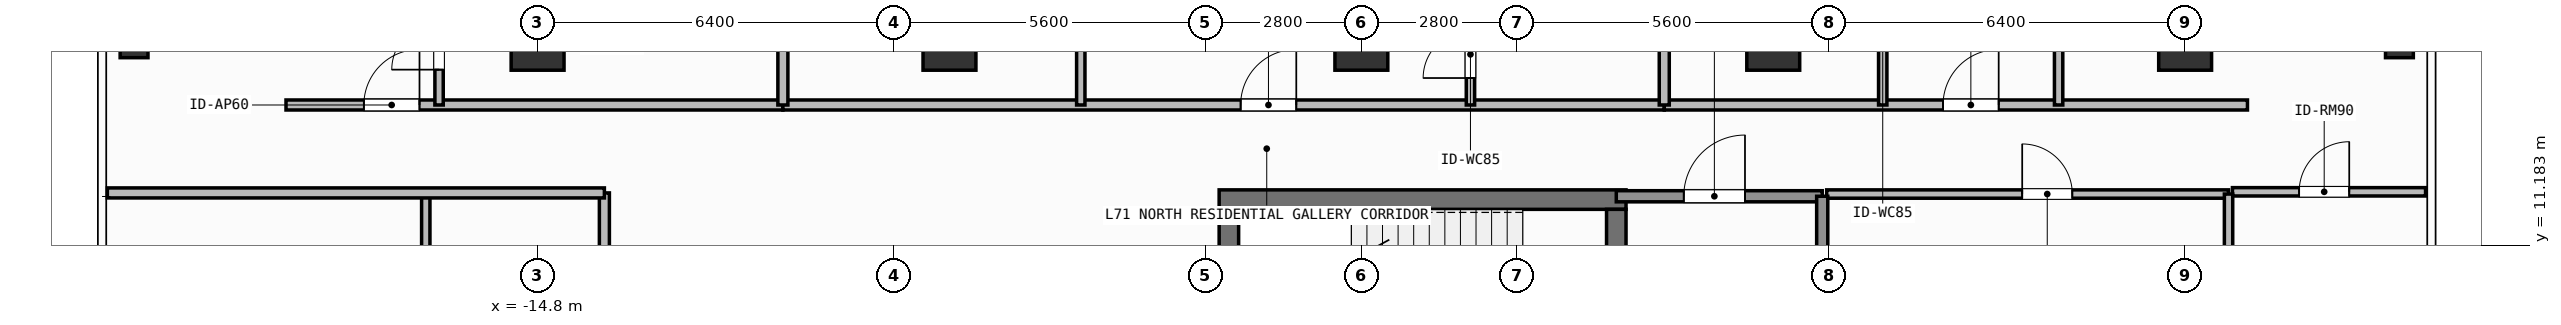
"""IFC4 building model, lengths in metres.
Left out: names, types, materials, properties, quantities, classifications, styles, units other than length and angle.
Written with IfcOpenShell. Run it as: python <this file> out.ifc"""

import sys

from ifc_helpers import new_model, si_unit, direction, frame, frame_2d, origin, origin_2d, place, context, subcontext, project, spatial, rectangle, hollow_rectangle, extrude, element, fill, save


model = new_model("IFC4")
c1 = context("Model", 3, precision=1e-05, world=origin(), true_north=direction((0.0, 1.0)))
c2 = subcontext(c1, "Body", "Model", "MODEL_VIEW")
j1 = project(units=[si_unit("LENGTHUNIT", "METRE"), si_unit("PLANEANGLEUNIT", "RADIAN")], contexts=[c1])
p1 = place(None, origin())
s1 = spatial("IfcSite", under=j1, at=p1, CompositionType="ELEMENT")
p2 = place(p1, origin())
s2 = spatial("IfcBuilding", under=s1, at=p2, CompositionType="ELEMENT")
p3 = place(p2, frame((0.0, 0.0, 289.8)))
s3 = spatial("IfcBuildingStorey", under=s2, at=p3, CompositionType="ELEMENT", Elevation=289.8)
p4 = place(p3, frame((-2.555, 12.0, 0.0), z_axis=(0.0, 0.0, 1.0), x_axis=(1.0, 0.0, 0.0)))
e1 = element("IfcWall", 1, at=p4, inside=s3, PredefinedType="SHEAR", context=c2, shape_type="SweptSolid", body=[
    extrude(rectangle(XDim=7.31, YDim=0.35, at=frame_2d((3.655, 0.0))), origin(), (0.0, 0.0, 1.0), 3.9),
])
p5 = place(p3, frame((-2.38, 8.9, 0.0), z_axis=(0.0, 0.0, 1.0), x_axis=(0.0, 1.0, 0.0)))
e2 = element("IfcWall", 2, at=p5, inside=s3, PredefinedType="SHEAR", context=c2, shape_type="SweptSolid", body=[
    extrude(rectangle(XDim=2.925, YDim=0.35, at=frame_2d((1.462, 0.0))), origin(), (0.0, 0.0, 1.0), 3.9),
])
p6 = place(p3, frame((4.58, 11.825, 0.0), z_axis=(0.0, 0.0, 1.0), x_axis=(0.0, -1.0, 0.0)))
e3 = element("IfcWall", 3, at=p6, inside=s3, PredefinedType="SHEAR", context=c2, shape_type="SweptSolid", body=[
    extrude(rectangle(XDim=2.925, YDim=0.35, at=frame_2d((1.462, 0.0))), origin(), (0.0, 0.0, 1.0), 3.9),
])
p7 = place(p6, frame((0.913, 0.0, 0.0)))
e4 = element("IfcOpeningElement", 4, at=p7, cuts=e3, PredefinedType="OPENING", context=c2, shape_type="SweptSolid", body=[
    extrude(rectangle(XDim=1.1, YDim=2.15, at=frame_2d((0.55, 1.075))), frame((0.0, 0.185, 0.0), z_axis=(0.0, -1.0, 0.0), x_axis=(1.0, 0.0, 0.0)), (0.0, 0.0, 1.0), 0.37),
])
for number, where, z_axis, x_axis in (
    (5, (-14.8, 14.8, 0.0), (0.0, 0.0, 1.0), (1.0, 0.0, 0.0)),
    (6, (-7.4, 14.8, 0.0), (0.0, 0.0, 1.0), (1.0, 0.0, 0.0)),
    (7, (0.0, 14.8, 0.0), (0.0, 0.0, 1.0), (1.0, 0.0, 0.0)),
    (8, (7.4, 14.8, 0.0), (0.0, 0.0, 1.0), (1.0, 0.0, 0.0)),
    (9, (14.8, 14.8, 0.0), (0.0, 0.0, 1.0), (1.0, 0.0, 0.0)),
):
    element("IfcColumn", number, at=place(p3, frame(where, z_axis=z_axis, x_axis=x_axis)), inside=s3, PredefinedType="COLUMN", context=c2, shape_type="SweptSolid", body=[
        extrude(rectangle(XDim=0.95, YDim=0.95, at=origin_2d()), origin(), (0.0, 0.0, 1.0), 3.9),
    ])
for number, where, z_axis, x_axis in (
    (10, (-22.05, 14.8, 0.0), (0.0, 0.0, 1.0), (1.0, 0.0, 0.0)),
    (11, (18.65, 14.8, 0.0), (0.0, 0.0, 1.0), (1.0, 0.0, 0.0)),
):
    element("IfcColumn", number, at=place(p3, frame(where, z_axis=z_axis, x_axis=x_axis)), inside=s3, PredefinedType="COLUMN", context=c2, shape_type="SweptSolid", body=[
        extrude(hollow_rectangle(XDim=0.5, YDim=0.5, WallThickness=0.025, at=origin_2d()), origin(), (0.0, 0.0, 1.0), 3.9),
    ])
p8 = place(p3, frame((4.58, 12.06, 0.0), z_axis=(0.0, 0.0, 1.0), x_axis=(1.0, 0.0, 0.0)))
e12 = element("IfcWall", 12, at=p8, inside=s3, PredefinedType="SOLIDWALL", context=c2, shape_type="SweptSolid", body=[
    extrude(rectangle(XDim=3.7, YDim=0.2, at=frame_2d((1.85, 0.0))), origin(), (0.0, 0.0, 1.0), 3.68),
])
p9 = place(p8, frame((1.212, 0.0, 0.0)))
e13 = element("IfcOpeningElement", 13, at=p9, cuts=e12, PredefinedType="OPENING", context=c2, shape_type="SweptSolid", body=[
    extrude(rectangle(XDim=1.1, YDim=2.15, at=frame_2d((0.55, 1.075))), frame((0.0, 0.11, 0.0), z_axis=(0.0, -1.0, 0.0), x_axis=(1.0, 0.0, 0.0)), (0.0, 0.0, 1.0), 0.22),
])
p10 = place(p3, frame((8.36, 12.1, 0.0), z_axis=(0.0, 0.0, 1.0), x_axis=(1.0, 0.0, 0.0)))
e14 = element("IfcWall", 14, at=p10, inside=s3, PredefinedType="PARTITIONING", context=c2, shape_type="SweptSolid", body=[
    extrude(rectangle(XDim=7.22, YDim=0.15, at=frame_2d((3.61, 0.0))), origin(), (0.0, 0.0, 1.0), 3.68),
])
p11 = place(p10, frame((3.513, 0.0, 0.0)))
e15 = element("IfcOpeningElement", 15, at=p11, cuts=e14, PredefinedType="OPENING", context=c2, shape_type="SweptSolid", body=[
    extrude(rectangle(XDim=0.9, YDim=2.1, at=frame_2d((0.45, 1.05))), frame((0.0, 0.085, 0.0), z_axis=(0.0, -1.0, 0.0), x_axis=(1.0, 0.0, 0.0)), (0.0, 0.0, 1.0), 0.17),
])
p12 = place(p3, frame((-19.32, 13.7, 0.0), z_axis=(0.0, 0.0, 1.0), x_axis=(1.0, 0.0, 0.0)))
e16 = element("IfcWall", 16, at=p12, inside=s3, PredefinedType="PARTITIONING", context=c2, shape_type="SweptSolid", body=[
    extrude(rectangle(XDim=8.927, YDim=0.18, at=frame_2d((4.463, 0.0))), origin(), (0.0, 0.0, 1.0), 3.68),
])
p13 = place(p12, frame((1.398, 0.0, 0.0)))
e17 = element("IfcOpeningElement", 17, at=p13, cuts=e16, PredefinedType="OPENING", context=c2, shape_type="SweptSolid", body=[
    extrude(rectangle(XDim=1.0, YDim=2.2, at=frame_2d((0.5, 1.1))), frame((0.0, 0.1, 0.0), z_axis=(0.0, -1.0, 0.0), x_axis=(1.0, 0.0, 0.0)), (0.0, 0.0, 1.0), 0.2),
])
p14 = place(p3, frame((-16.57, 13.7, 0.0), z_axis=(0.0, 0.0, 1.0), x_axis=(0.0, 1.0, 0.0)))
e18 = element("IfcWall", 18, at=p14, inside=s3, PredefinedType="PARTITIONING", context=c2, shape_type="SweptSolid", body=[
    extrude(rectangle(XDim=2.12, YDim=0.15, at=frame_2d((1.06, 0.0))), origin(), (0.0, 0.0, 1.0), 3.68),
])
p15 = place(p14, frame((0.635, 0.0, 0.0)))
e19 = element("IfcOpeningElement", 19, at=p15, cuts=e18, PredefinedType="OPENING", context=c2, shape_type="SweptSolid", body=[
    extrude(rectangle(XDim=0.85, YDim=2.1, at=frame_2d((0.425, 1.05))), frame((0.0, 0.085, 0.0), z_axis=(0.0, -1.0, 0.0), x_axis=(1.0, 0.0, 0.0)), (0.0, 0.0, 1.0), 0.17),
])
p16 = place(p3, frame((-10.393, 13.7, 0.0), z_axis=(0.0, 0.0, 1.0), x_axis=(1.0, 0.0, 0.0)))
e20 = element("IfcWall", 20, at=p16, inside=s3, PredefinedType="PARTITIONING", context=c2, shape_type="SweptSolid", body=[
    extrude(rectangle(XDim=15.835, YDim=0.18, at=frame_2d((7.917, 0.0))), origin(), (0.0, 0.0, 1.0), 3.68),
])
p17 = place(p16, frame((8.224, 0.0, 0.0)))
e21 = element("IfcOpeningElement", 21, at=p17, cuts=e20, PredefinedType="OPENING", context=c2, shape_type="SweptSolid", body=[
    extrude(rectangle(XDim=1.0, YDim=2.2, at=frame_2d((0.5, 1.1))), frame((0.0, 0.1, 0.0), z_axis=(0.0, -1.0, 0.0), x_axis=(1.0, 0.0, 0.0)), (0.0, 0.0, 1.0), 0.2),
])
p18 = place(p3, frame((-5.041, 13.7, 0.0), z_axis=(0.0, 0.0, 1.0), x_axis=(0.0, 1.0, 0.0)))
e22 = element("IfcWall", 22, at=p18, inside=s3, PredefinedType="PARTITIONING", context=c2, shape_type="SweptSolid", body=[
    extrude(rectangle(XDim=3.538, YDim=0.15, at=frame_2d((1.769, 0.0))), origin(), (0.0, 0.0, 1.0), 3.68),
])
p19 = place(p18, frame((1.344, 0.0, 0.0)))
e23 = element("IfcOpeningElement", 23, at=p19, cuts=e22, PredefinedType="OPENING", context=c2, shape_type="SweptSolid", body=[
    extrude(rectangle(XDim=0.85, YDim=2.1, at=frame_2d((0.425, 1.05))), frame((0.0, 0.085, 0.0), z_axis=(0.0, -1.0, 0.0), x_axis=(1.0, 0.0, 0.0)), (0.0, 0.0, 1.0), 0.17),
])
p20 = place(p3, frame((1.96, 13.7, 0.0), z_axis=(0.0, 0.0, 1.0), x_axis=(0.0, 1.0, 0.0)))
e24 = element("IfcWall", 24, at=p20, inside=s3, PredefinedType="PARTITIONING", context=c2, shape_type="SweptSolid", body=[
    extrude(rectangle(XDim=1.981, YDim=0.15, at=frame_2d((0.99, 0.0))), origin(), (0.0, 0.0, 1.0), 3.68),
])
p21 = place(p20, frame((0.484, 0.0, 0.0)))
e25 = element("IfcOpeningElement", 25, at=p21, cuts=e24, PredefinedType="OPENING", context=c2, shape_type="SweptSolid", body=[
    extrude(rectangle(XDim=0.85, YDim=2.1, at=frame_2d((0.425, 1.05))), frame((0.0, 0.085, 0.0), z_axis=(0.0, -1.0, 0.0), x_axis=(1.0, 0.0, 0.0)), (0.0, 0.0, 1.0), 0.17),
])
p22 = place(p3, frame((5.442, 13.7, 0.0), z_axis=(0.0, 0.0, 1.0), x_axis=(1.0, 0.0, 0.0)))
e26 = element("IfcWall", 26, at=p22, inside=s3, PredefinedType="PARTITIONING", context=c2, shape_type="SweptSolid", body=[
    extrude(rectangle(XDim=10.478, YDim=0.18, at=frame_2d((5.239, 0.0))), origin(), (0.0, 0.0, 1.0), 3.68),
])
p23 = place(p22, frame((5.008, 0.0, 0.0)))
e27 = element("IfcOpeningElement", 27, at=p23, cuts=e26, PredefinedType="OPENING", context=c2, shape_type="SweptSolid", body=[
    extrude(rectangle(XDim=1.0, YDim=2.2, at=frame_2d((0.5, 1.1))), frame((0.0, 0.1, 0.0), z_axis=(0.0, -1.0, 0.0), x_axis=(1.0, 0.0, 0.0)), (0.0, 0.0, 1.0), 0.2),
])
p24 = place(p3, frame((9.367, 13.7, 0.0), z_axis=(0.0, 0.0, 1.0), x_axis=(0.0, 1.0, 0.0)))
e28 = element("IfcWall", 28, at=p24, inside=s3, PredefinedType="PARTITIONING", context=c2, shape_type="SweptSolid", body=[
    extrude(rectangle(XDim=4.081, YDim=0.15, at=frame_2d((2.041, 0.0))), origin(), (0.0, 0.0, 1.0), 3.68),
])
p25 = place(p24, frame((1.53, 0.0, 0.0)))
e29 = element("IfcOpeningElement", 29, at=p25, cuts=e28, PredefinedType="OPENING", context=c2, shape_type="SweptSolid", body=[
    extrude(rectangle(XDim=0.85, YDim=2.1, at=frame_2d((0.425, 1.05))), frame((0.0, 0.085, 0.0), z_axis=(0.0, -1.0, 0.0), x_axis=(1.0, 0.0, 0.0)), (0.0, 0.0, 1.0), 0.17),
])
p26 = place(p3, frame((12.527, 13.7, 0.0), z_axis=(0.0, 0.0, 1.0), x_axis=(0.0, 1.0, 0.0)))
e30 = element("IfcWall", 30, at=p26, inside=s3, PredefinedType="PARTITIONING", context=c2, shape_type="SweptSolid", body=[
    extrude(rectangle(XDim=4.081, YDim=0.15, at=frame_2d((2.041, 0.0))), origin(), (0.0, 0.0, 1.0), 3.68),
])
p27 = place(p26, frame((1.53, 0.0, 0.0)))
e31 = element("IfcOpeningElement", 31, at=p27, cuts=e30, PredefinedType="OPENING", context=c2, shape_type="SweptSolid", body=[
    extrude(rectangle(XDim=0.85, YDim=2.1, at=frame_2d((0.425, 1.05))), frame((0.0, 0.085, 0.0), z_axis=(0.0, -1.0, 0.0), x_axis=(1.0, 0.0, 0.0)), (0.0, 0.0, 1.0), 0.17),
])
p28 = place(p3, frame((-13.6, -1.164, 0.0), z_axis=(0.0, 0.0, 1.0), x_axis=(0.0, 1.0, 0.0)))
e32 = element("IfcWall", 32, at=p28, inside=s3, PredefinedType="PARTITIONING", context=c2, shape_type="SweptSolid", body=[
    extrude(rectangle(XDim=13.284, YDim=0.18, at=frame_2d((6.642, 0.0))), origin(), (0.0, 0.0, 1.0), 3.68),
])
p29 = place(p28, frame((6.767, 0.0, 0.0)))
e33 = element("IfcOpeningElement", 33, at=p29, cuts=e32, PredefinedType="OPENING", context=c2, shape_type="SweptSolid", body=[
    extrude(rectangle(XDim=1.0, YDim=2.2, at=frame_2d((0.5, 1.1))), frame((0.0, 0.1, 0.0), z_axis=(0.0, -1.0, 0.0), x_axis=(1.0, 0.0, 0.0)), (0.0, 0.0, 1.0), 0.2),
])
p30 = place(p3, frame((15.65, 12.14, 0.0), z_axis=(0.0, 0.0, 1.0), x_axis=(1.0, 0.0, 0.0)))
e34 = element("IfcWall", 34, at=p30, inside=s3, PredefinedType="PARTITIONING", context=c2, shape_type="SweptSolid", body=[
    extrude(rectangle(XDim=3.47, YDim=0.15, at=frame_2d((1.735, 0.0))), origin(), (0.0, 0.0, 1.0), 3.68),
])
p31 = place(p30, frame((1.198, 0.0, 0.0)))
e35 = element("IfcOpeningElement", 35, at=p31, cuts=e34, PredefinedType="OPENING", context=c2, shape_type="SweptSolid", body=[
    extrude(rectangle(XDim=0.9, YDim=2.1, at=frame_2d((0.45, 1.05))), frame((0.0, 0.085, 0.0), z_axis=(0.0, -1.0, 0.0), x_axis=(1.0, 0.0, 0.0)), (0.0, 0.0, 1.0), 0.17),
])
p32 = place(p3, frame((8.28, 8.725, 0.0), z_axis=(0.0, 0.0, 1.0), x_axis=(0.0, 1.0, 0.0)))
e36 = element("IfcWall", 36, at=p32, inside=s3, PredefinedType="SOLIDWALL", context=c2, shape_type="SweptSolid", body=[
    extrude(rectangle(XDim=3.335, YDim=0.2, at=frame_2d((1.667, 0.0))), origin(), (0.0, 0.0, 1.0), 3.68),
])
p33 = place(p3, frame((15.58, 5.85, 0.0), z_axis=(0.0, 0.0, 1.0), x_axis=(0.0, 1.0, 0.0)))
e37 = element("IfcWall", 37, at=p33, inside=s3, PredefinedType="PARTITIONING", context=c2, shape_type="SweptSolid", body=[
    extrude(rectangle(XDim=6.25, YDim=0.15, at=frame_2d((3.125, 0.0))), origin(), (0.0, 0.0, 1.0), 3.68),
])
for number, where, z_axis, x_axis in (
    (38, (-10.393, 13.7, 0.0), (0.0, 0.0, 1.0), (0.0, 1.0, 0.0)),
    (39, (5.442, 13.7, 0.0), (0.0, 0.0, 1.0), (0.0, 1.0, 0.0)),
):
    element("IfcWall", number, at=place(p3, frame(where, z_axis=z_axis, x_axis=x_axis)), inside=s3, PredefinedType="PARTITIONING", context=c2, shape_type="SweptSolid", body=[
        extrude(rectangle(XDim=7.33, YDim=0.18, at=frame_2d((3.665, 0.0))), origin(), (0.0, 0.0, 1.0), 3.68),
    ])
p34 = place(p3, frame((-16.809, 9.32, 0.0), z_axis=(0.0, 0.0, 1.0), x_axis=(0.0, 1.0, 0.0)))
e40 = element("IfcWall", 40, at=p34, inside=s3, PredefinedType="PARTITIONING", context=c2, shape_type="SweptSolid", body=[
    extrude(rectangle(XDim=2.8, YDim=0.15, at=frame_2d((1.4, 0.0))), origin(), (0.0, 0.0, 1.0), 3.68),
])
p35 = place(p3, frame((-22.53, 12.12, 0.0), z_axis=(0.0, 0.0, 1.0), x_axis=(1.0, 0.0, 0.0)))
e41 = element("IfcWall", 41, at=p35, inside=s3, PredefinedType="PARTITIONING", context=c2, shape_type="SweptSolid", body=[
    extrude(rectangle(XDim=8.93, YDim=0.18, at=frame_2d((4.465, 0.0))), origin(), (0.0, 0.0, 1.0), 3.68),
])
p36 = place(p9, origin())
e42 = element("IfcDoor", 42, at=p36, inside=s3, OperationType="SINGLE_SWING_RIGHT", PredefinedType="DOOR", context=c2, shape_type="SweptSolid", body=[
    extrude(rectangle(XDim=1.1, YDim=2.15, at=frame_2d((0.55, 1.075))), frame((0.0, 0.025, 0.0), z_axis=(0.0, -1.0, 0.0), x_axis=(1.0, 0.0, 0.0)), (0.0, 0.0, 1.0), 0.05),
])
fill(e13, e42)
p37 = place(p11, origin())
e43 = element("IfcDoor", 43, at=p37, inside=s3, OperationType="SINGLE_SWING_LEFT", PredefinedType="DOOR", context=c2, shape_type="SweptSolid", body=[
    extrude(rectangle(XDim=0.9, YDim=2.1, at=frame_2d((0.45, 1.05))), frame((0.0, 0.025, 0.0), z_axis=(0.0, -1.0, 0.0), x_axis=(1.0, 0.0, 0.0)), (0.0, 0.0, 1.0), 0.05),
])
fill(e15, e43)
p38 = place(p13, origin())
e44 = element("IfcDoor", 44, at=p38, inside=s3, OperationType="SINGLE_SWING_RIGHT", PredefinedType="DOOR", context=c2, shape_type="SweptSolid", body=[
    extrude(rectangle(XDim=1.0, YDim=2.2, at=frame_2d((0.5, 1.1))), frame((0.0, 0.025, 0.0), z_axis=(0.0, -1.0, 0.0), x_axis=(1.0, 0.0, 0.0)), (0.0, 0.0, 1.0), 0.05),
])
fill(e17, e44)
p39 = place(p15, origin())
e45 = element("IfcDoor", 45, at=p39, inside=s3, OperationType="SINGLE_SWING_LEFT", PredefinedType="DOOR", context=c2, shape_type="SweptSolid", body=[
    extrude(rectangle(XDim=0.85, YDim=2.1, at=frame_2d((0.425, 1.05))), frame((0.0, 0.025, 0.0), z_axis=(0.0, -1.0, 0.0), x_axis=(1.0, 0.0, 0.0)), (0.0, 0.0, 1.0), 0.05),
])
fill(e19, e45)
p40 = place(p17, origin())
e46 = element("IfcDoor", 46, at=p40, inside=s3, OperationType="SINGLE_SWING_RIGHT", PredefinedType="DOOR", context=c2, shape_type="SweptSolid", body=[
    extrude(rectangle(XDim=1.0, YDim=2.2, at=frame_2d((0.5, 1.1))), frame((0.0, 0.025, 0.0), z_axis=(0.0, -1.0, 0.0), x_axis=(1.0, 0.0, 0.0)), (0.0, 0.0, 1.0), 0.05),
])
fill(e21, e46)
p41 = place(p21, origin())
e47 = element("IfcDoor", 47, at=p41, inside=s3, OperationType="SINGLE_SWING_LEFT", PredefinedType="DOOR", context=c2, shape_type="SweptSolid", body=[
    extrude(rectangle(XDim=0.85, YDim=2.1, at=frame_2d((0.425, 1.05))), frame((0.0, 0.025, 0.0), z_axis=(0.0, -1.0, 0.0), x_axis=(1.0, 0.0, 0.0)), (0.0, 0.0, 1.0), 0.05),
])
fill(e25, e47)
p42 = place(p23, origin())
e48 = element("IfcDoor", 48, at=p42, inside=s3, OperationType="SINGLE_SWING_RIGHT", PredefinedType="DOOR", context=c2, shape_type="SweptSolid", body=[
    extrude(rectangle(XDim=1.0, YDim=2.2, at=frame_2d((0.5, 1.1))), frame((0.0, 0.025, 0.0), z_axis=(0.0, -1.0, 0.0), x_axis=(1.0, 0.0, 0.0)), (0.0, 0.0, 1.0), 0.05),
])
fill(e27, e48)
p43 = place(p31, origin())
e49 = element("IfcDoor", 49, at=p43, inside=s3, OperationType="SINGLE_SWING_RIGHT", PredefinedType="DOOR", context=c2, shape_type="SweptSolid", body=[
    extrude(rectangle(XDim=0.9, YDim=2.1, at=frame_2d((0.45, 1.05))), frame((0.0, 0.025, 0.0), z_axis=(0.0, -1.0, 0.0), x_axis=(1.0, 0.0, 0.0)), (0.0, 0.0, 1.0), 0.05),
])
fill(e35, e49)
save(model, sys.argv[1])
